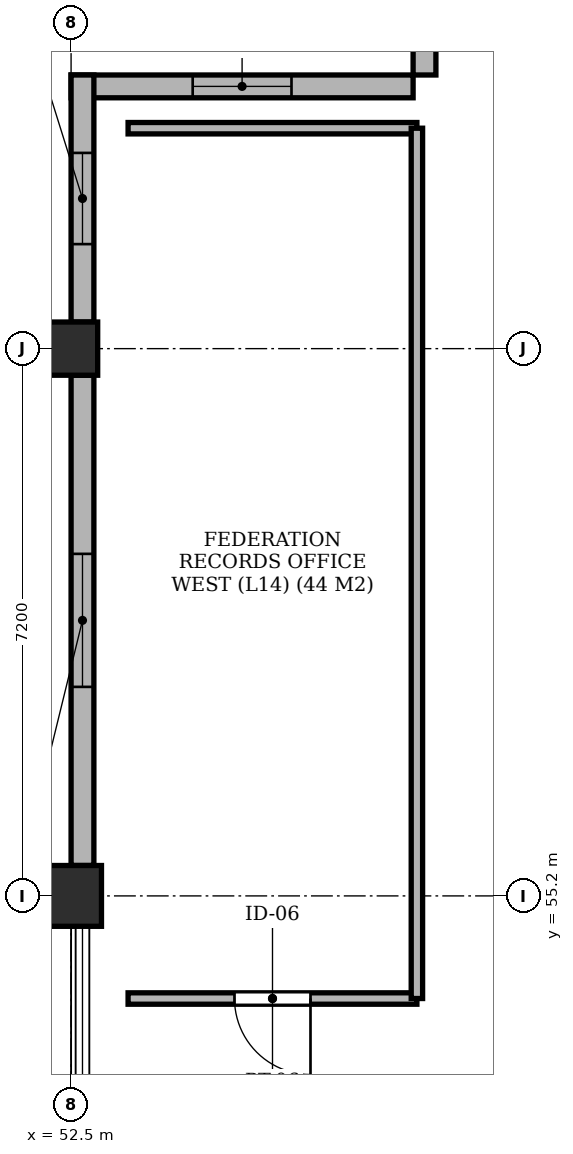
"""IFC4 building model, lengths in metres.
Left out: names, types, materials, properties, quantities, classifications, styles, units other than length and angle.
Written with IfcOpenShell. Run it as: python <this file> out.ifc"""

import sys

from ifc_helpers import new_model, si_unit, direction, frame, frame_2d, origin, origin_2d, place, context, subcontext, project, spatial, rectangle, extrude, element, fill, save


model = new_model("IFC4")
c1 = context("Model", 3, precision=1e-05, world=origin(), true_north=direction((0.0, 1.0)))
c2 = subcontext(c1, "Body", "Model", "MODEL_VIEW")
j1 = project(units=[si_unit("LENGTHUNIT", "METRE"), si_unit("PLANEANGLEUNIT", "RADIAN")], contexts=[c1])
p1 = place(None, origin())
s1 = spatial("IfcSite", under=j1, at=p1, CompositionType="ELEMENT")
p2 = place(p1, origin())
s2 = spatial("IfcBuilding", under=s1, at=p2, CompositionType="ELEMENT")
p3 = place(p2, frame((0.0, 0.0, 56.8)))
s3 = spatial("IfcBuildingStorey", under=s2, at=p3, CompositionType="ELEMENT", Elevation=56.8)
p4 = place(p3, frame((52.5, 55.2, -0.22), z_axis=(0.0, 0.0, 1.0), x_axis=(1.0, 0.0, 0.0)))
e1 = element("IfcColumn", 1, at=p4, inside=s3, PredefinedType="COLUMN", context=c2, shape_type="SweptSolid", body=[
    extrude(rectangle(XDim=0.8, YDim=0.8, at=origin_2d()), origin(), (0.0, 0.0, 1.0), 3.26),
])
p5 = place(p3, frame((52.5, 62.4, -0.22), z_axis=(0.0, 0.0, 1.0), x_axis=(1.0, 0.0, 0.0)))
e2 = element("IfcColumn", 2, at=p5, inside=s3, PredefinedType="COLUMN", context=c2, shape_type="SweptSolid", body=[
    extrude(rectangle(XDim=0.7, YDim=0.7, at=origin_2d()), origin(), (0.0, 0.0, 1.0), 3.26),
])
p6 = place(p3, frame((57.15, 69.6, 0.0), z_axis=(0.0, 0.0, 1.0), x_axis=(0.0, -1.0, 0.0)))
e3 = element("IfcWall", 3, at=p6, inside=s3, PredefinedType="SOLIDWALL", context=c2, shape_type="SweptSolid", body=[
    extrude(rectangle(XDim=3.6, YDim=0.3, at=frame_2d((1.8, 0.0))), origin(), (0.0, 0.0, 1.0), 2.53),
])
p7 = place(p3, frame((57.0, 65.85, 0.0), z_axis=(0.0, 0.0, 1.0), x_axis=(-1.0, 0.0, 0.0)))
e4 = element("IfcWall", 4, at=p7, inside=s3, PredefinedType="SOLIDWALL", context=c2, shape_type="SweptSolid", body=[
    extrude(rectangle(XDim=4.5, YDim=0.3, at=frame_2d((2.25, 0.0))), origin(), (0.0, 0.0, 1.0), 2.53),
])
p8 = place(p7, frame((1.6, 0.0, 0.62)))
e5 = element("IfcOpeningElement", 5, at=p8, cuts=e4, PredefinedType="OPENING", context=c2, shape_type="SweptSolid", body=[
    extrude(rectangle(XDim=1.3, YDim=1.8, at=frame_2d((0.65, 0.9))), frame((0.0, 0.162, 0.0), z_axis=(0.0, -1.0, 0.0), x_axis=(1.0, 0.0, 0.0)), (0.0, 0.0, 1.0), 0.324),
])
p9 = place(p3, frame((52.65, 66.0, 0.0), z_axis=(0.0, 0.0, 1.0), x_axis=(0.0, -1.0, 0.0)))
e6 = element("IfcWall", 6, at=p9, inside=s3, PredefinedType="SOLIDWALL", context=c2, shape_type="SweptSolid", body=[
    extrude(rectangle(XDim=3.25, YDim=0.3, at=frame_2d((1.625, 0.0))), origin(), (0.0, 0.0, 1.0), 2.53),
])
p10 = place(p9, frame((1.025, 0.0, 0.62)))
e7 = element("IfcOpeningElement", 7, at=p10, cuts=e6, PredefinedType="OPENING", context=c2, shape_type="SweptSolid", body=[
    extrude(rectangle(XDim=1.2, YDim=1.7, at=frame_2d((0.6, 0.85))), frame((0.0, 0.162, 0.0), z_axis=(0.0, -1.0, 0.0), x_axis=(1.0, 0.0, 0.0)), (0.0, 0.0, 1.0), 0.324),
])
p11 = place(p3, frame((52.65, 62.05, 0.0), z_axis=(0.0, 0.0, 1.0), x_axis=(0.0, -1.0, 0.0)))
e8 = element("IfcWall", 8, at=p11, inside=s3, PredefinedType="SOLIDWALL", context=c2, shape_type="SweptSolid", body=[
    extrude(rectangle(XDim=6.45, YDim=0.3, at=frame_2d((3.225, 0.0))), origin(), (0.0, 0.0, 1.0), 2.53),
])
p12 = place(p11, frame((2.35, 0.0, 0.62)))
e9 = element("IfcOpeningElement", 9, at=p12, cuts=e8, PredefinedType="OPENING", context=c2, shape_type="SweptSolid", body=[
    extrude(rectangle(XDim=1.75, YDim=1.81, at=frame_2d((0.875, 0.905))), frame((0.0, 0.162, 0.0), z_axis=(0.0, -1.0, 0.0), x_axis=(1.0, 0.0, 0.0)), (0.0, 0.0, 1.0), 0.324),
])
p13 = place(p3, frame((53.25, 53.85, 0.0), z_axis=(0.0, 0.0, 1.0), x_axis=(1.0, 0.0, 0.0)))
e10 = element("IfcWall", 10, at=p13, inside=s3, PredefinedType="PARTITIONING", context=c2, shape_type="SweptSolid", body=[
    extrude(rectangle(XDim=3.8, YDim=0.15, at=frame_2d((1.9, 0.0))), origin(), (0.0, 0.0, 1.0), 2.53),
])
p14 = place(p13, frame((1.4, 0.0, 0.0)))
e11 = element("IfcOpeningElement", 11, at=p14, cuts=e10, PredefinedType="OPENING", context=c2, shape_type="SweptSolid", body=[
    extrude(rectangle(XDim=1.0, YDim=2.15, at=frame_2d((0.5, 1.075))), frame((0.0, 0.087, 0.0), z_axis=(0.0, -1.0, 0.0), x_axis=(1.0, 0.0, 0.0)), (0.0, 0.0, 1.0), 0.174),
])
p15 = place(p3, frame((53.25, 65.3, 0.0), z_axis=(0.0, 0.0, 1.0), x_axis=(1.0, 0.0, 0.0)))
e12 = element("IfcWall", 12, at=p15, inside=s3, PredefinedType="PARTITIONING", context=c2, shape_type="SweptSolid", body=[
    extrude(rectangle(XDim=3.8, YDim=0.15, at=frame_2d((1.9, 0.0))), origin(), (0.0, 0.0, 1.0), 2.53),
])
p16 = place(p3, frame((57.05, 53.85, 0.0), z_axis=(0.0, 0.0, 1.0), x_axis=(0.0, 1.0, 0.0)))
e13 = element("IfcWall", 13, at=p16, inside=s3, PredefinedType="PARTITIONING", context=c2, shape_type="SweptSolid", body=[
    extrude(rectangle(XDim=11.45, YDim=0.15, at=frame_2d((5.725, 0.0))), origin(), (0.0, 0.0, 1.0), 2.53),
])
p17 = place(p8, origin())
e14 = element("IfcWindow", 14, at=p17, inside=s3, PartitioningType="SINGLE_PANEL", PredefinedType="WINDOW", context=c2, shape_type="SweptSolid", body=[
    extrude(rectangle(XDim=1.3, YDim=1.8, at=frame_2d((0.65, 0.9))), frame((0.0, 0.03, 0.0), z_axis=(0.0, -1.0, 0.0), x_axis=(1.0, 0.0, 0.0)), (0.0, 0.0, 1.0), 0.06),
])
fill(e5, e14)
p18 = place(p10, origin())
e15 = element("IfcWindow", 15, at=p18, inside=s3, PartitioningType="SINGLE_PANEL", PredefinedType="WINDOW", context=c2, shape_type="SweptSolid", body=[
    extrude(rectangle(XDim=1.2, YDim=1.7, at=frame_2d((0.6, 0.85))), frame((0.0, 0.03, 0.0), z_axis=(0.0, -1.0, 0.0), x_axis=(1.0, 0.0, 0.0)), (0.0, 0.0, 1.0), 0.06),
])
fill(e7, e15)
p19 = place(p12, origin())
e16 = element("IfcWindow", 16, at=p19, inside=s3, PartitioningType="SINGLE_PANEL", PredefinedType="WINDOW", context=c2, shape_type="SweptSolid", body=[
    extrude(rectangle(XDim=1.75, YDim=1.81, at=frame_2d((0.875, 0.905))), frame((0.0, 0.03, 0.0), z_axis=(0.0, -1.0, 0.0), x_axis=(1.0, 0.0, 0.0)), (0.0, 0.0, 1.0), 0.06),
])
fill(e9, e16)
p20 = place(p14, frame((1.0, 0.0, 0.0), z_axis=(0.0, 0.0, 1.0), x_axis=(-1.0, 0.0, 0.0)))
e17 = element("IfcDoor", 17, at=p20, inside=s3, OperationType="SINGLE_SWING_RIGHT", PredefinedType="DOOR", context=c2, shape_type="SweptSolid", body=[
    extrude(rectangle(XDim=1.0, YDim=2.15, at=frame_2d((0.5, 1.075))), frame((0.0, 0.025, 0.0), z_axis=(0.0, -1.0, 0.0), x_axis=(1.0, 0.0, 0.0)), (0.0, 0.0, 1.0), 0.05),
])
fill(e11, e17)
save(model, sys.argv[1])
